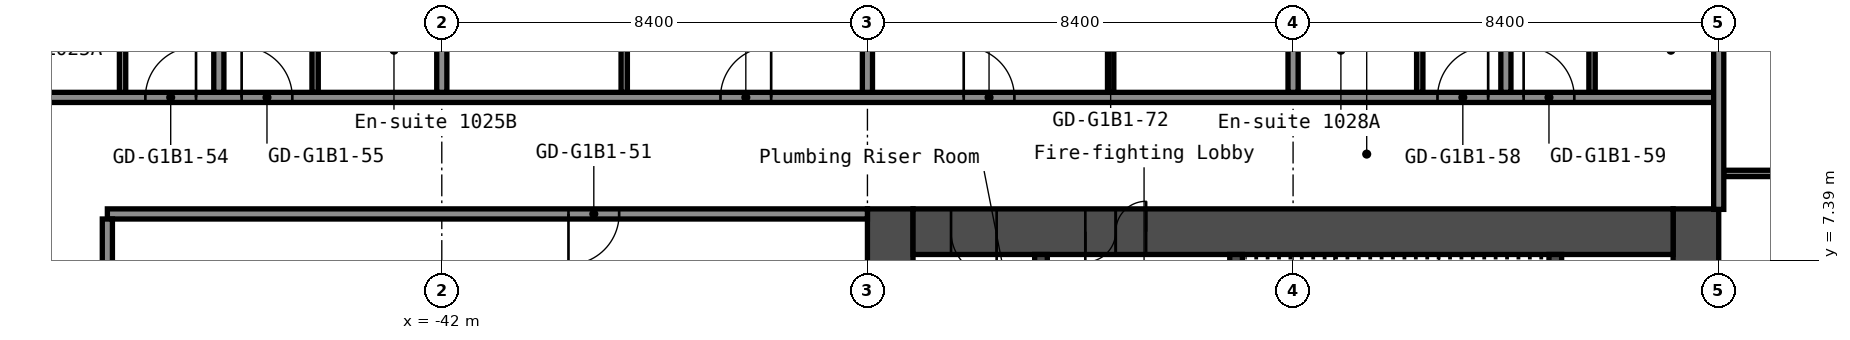
"""IFC4 building model, lengths in metres.
Left out: names, types, materials, properties, quantities, classifications, styles, units other than length and angle.
Written with IfcOpenShell. Run it as: python <this file> out.ifc"""

import sys

from ifc_helpers import new_model, si_unit, direction, frame, frame_2d, origin, place, context, subcontext, project, spatial, rectangle, extrude, element, fill, save


model = new_model("IFC4")
c1 = context("Model", 3, precision=1e-05, world=origin(), true_north=direction((0.0, 1.0)))
c2 = subcontext(c1, "Body", "Model", "MODEL_VIEW")
j1 = project(units=[si_unit("LENGTHUNIT", "METRE"), si_unit("PLANEANGLEUNIT", "RADIAN")], contexts=[c1])
p1 = place(None, origin())
s1 = spatial("IfcSite", under=j1, at=p1, CompositionType="ELEMENT")
p2 = place(p1, origin())
s2 = spatial("IfcBuilding", under=s1, at=p2, CompositionType="ELEMENT")
p3 = place(p2, frame((0.0, 0.0, 39.0)))
s3 = spatial("IfcBuildingStorey", under=s2, at=p3, CompositionType="ELEMENT", Elevation=39.0)
p4 = place(p3, frame((-17.25, -8.4, 0.0), z_axis=(0.0, 0.0, 1.0), x_axis=(0.0, 1.0, 0.0)))
e1 = element("IfcWall", 1, at=p4, inside=s3, PredefinedType="SHEAR", context=c2, shape_type="SweptSolid", body=[
    extrude(rectangle(XDim=16.8, YDim=0.9, at=frame_2d((8.4, 0.0))), origin(), (0.0, 0.0, 1.0), 2.8),
])
p5 = place(p4, frame((12.75, 0.0, 0.0)))
e2 = element("IfcOpeningElement", 2, at=p5, cuts=e1, PredefinedType="OPENING", context=c2, shape_type="SweptSolid", body=[
    extrude(rectangle(XDim=1.2, YDim=2.1, at=frame_2d((0.6, 1.05))), frame((0.0, 0.46, 0.0), z_axis=(0.0, -1.0, 0.0), x_axis=(1.0, 0.0, 0.0)), (0.0, 0.0, 1.0), 0.92),
])
p6 = place(p4, frame((2.85, 0.0, 0.0)))
e3 = element("IfcOpeningElement", 3, at=p6, cuts=e1, PredefinedType="OPENING", context=c2, shape_type="SweptSolid", body=[
    extrude(rectangle(XDim=1.2, YDim=2.1, at=frame_2d((0.6, 1.05))), frame((0.0, 0.46, 0.0), z_axis=(0.0, -1.0, 0.0), x_axis=(1.0, 0.0, 0.0)), (0.0, 0.0, 1.0), 0.92),
])
p7 = place(p3, frame((-33.15, -8.4, 0.0), z_axis=(0.0, 0.0, 1.0), x_axis=(0.0, 1.0, 0.0)))
e4 = element("IfcWall", 4, at=p7, inside=s3, PredefinedType="SHEAR", context=c2, shape_type="SweptSolid", body=[
    extrude(rectangle(XDim=16.8, YDim=0.9, at=frame_2d((8.4, 0.0))), origin(), (0.0, 0.0, 1.0), 2.8),
])
p8 = place(p3, frame((-32.7, 7.95, 0.0), z_axis=(0.0, 0.0, 1.0), x_axis=(1.0, 0.0, 0.0)))
e5 = element("IfcWall", 5, at=p8, inside=s3, PredefinedType="SHEAR", context=c2, shape_type="SweptSolid", body=[
    extrude(rectangle(XDim=15.0, YDim=0.9, at=frame_2d((7.5, 0.0))), origin(), (0.0, 0.0, 1.0), 2.8),
])
p9 = place(p8, frame((3.4, 0.0, 0.0)))
e6 = element("IfcOpeningElement", 6, at=p9, cuts=e5, PredefinedType="OPENING", context=c2, shape_type="SweptSolid", body=[
    extrude(rectangle(XDim=1.2, YDim=2.1, at=frame_2d((0.6, 1.05))), frame((0.0, 0.46, 0.0), z_axis=(0.0, -1.0, 0.0), x_axis=(1.0, 0.0, 0.0)), (0.0, 0.0, 1.0), 0.92),
])
p10 = place(p8, frame((0.75, 0.0, 0.0)))
e7 = element("IfcOpeningElement", 7, at=p10, cuts=e5, PredefinedType="OPENING", context=c2, shape_type="SweptSolid", body=[
    extrude(rectangle(XDim=0.9, YDim=2.1, at=frame_2d((0.45, 1.05))), frame((0.0, 0.46, 0.0), z_axis=(0.0, -1.0, 0.0), x_axis=(1.0, 0.0, 0.0)), (0.0, 0.0, 1.0), 0.92),
])
p11 = place(p3, frame((-20.025, 1.2, 0.0), z_axis=(0.0, 0.0, 1.0), x_axis=(0.0, 1.0, 0.0)))
e8 = element("IfcWall", 8, at=p11, inside=s3, PredefinedType="SHEAR", context=c2, shape_type="SweptSolid", body=[
    extrude(rectangle(XDim=6.3, YDim=0.25, at=frame_2d((3.15, 0.0))), origin(), (0.0, 0.0, 1.0), 2.8),
])
p12 = place(p3, frame((-26.325, 3.75, 0.0), z_axis=(0.0, 0.0, 1.0), x_axis=(0.0, 1.0, 0.0)))
e9 = element("IfcWall", 9, at=p12, inside=s3, PredefinedType="SHEAR", context=c2, shape_type="SweptSolid", body=[
    extrude(rectangle(XDim=3.75, YDim=0.25, at=frame_2d((1.875, 0.0))), origin(), (0.0, 0.0, 1.0), 2.8),
])
p13 = place(p12, frame((1.25, 0.0, 0.0)))
e10 = element("IfcOpeningElement", 10, at=p13, cuts=e9, PredefinedType="OPENING", context=c2, shape_type="SweptSolid", body=[
    extrude(rectangle(XDim=1.2, YDim=2.1, at=frame_2d((0.6, 1.05))), frame((0.0, 0.135, 0.0), z_axis=(0.0, -1.0, 0.0), x_axis=(1.0, 0.0, 0.0)), (0.0, 0.0, 1.0), 0.27),
])
p14 = place(p3, frame((-30.175, 1.45, 0.0), z_axis=(0.0, 0.0, 1.0), x_axis=(0.0, 1.0, 0.0)))
e11 = element("IfcWall", 11, at=p14, inside=s3, PredefinedType="SHEAR", context=c2, shape_type="SweptSolid", body=[
    extrude(rectangle(XDim=6.05, YDim=0.25, at=frame_2d((3.025, 0.0))), origin(), (0.0, 0.0, 1.0), 2.8),
])
p15 = place(p14, frame((2.625, 0.0, 0.0)))
e12 = element("IfcOpeningElement", 12, at=p15, cuts=e11, PredefinedType="OPENING", context=c2, shape_type="SweptSolid", body=[
    extrude(rectangle(XDim=1.1, YDim=2.1, at=frame_2d((0.55, 1.05))), frame((0.0, 0.135, 0.0), z_axis=(0.0, -1.0, 0.0), x_axis=(1.0, 0.0, 0.0)), (0.0, 0.0, 1.0), 0.27),
])
p16 = place(p3, frame((-48.6, 8.3, 0.0), z_axis=(0.0, 0.0, 1.0), x_axis=(1.0, 0.0, 0.0)))
e13 = element("IfcWall", 13, at=p16, inside=s3, PredefinedType="PARTITIONING", context=c2, shape_type="SweptSolid", body=[
    extrude(rectangle(XDim=15.0, YDim=0.2, at=frame_2d((7.5, 0.0))), origin(), (0.0, 0.0, 1.0), 2.8),
])
p17 = place(p16, frame((9.1, 0.0, 0.0)))
e14 = element("IfcOpeningElement", 14, at=p17, cuts=e13, PredefinedType="OPENING", context=c2, shape_type="SweptSolid", body=[
    extrude(rectangle(XDim=1.0, YDim=2.1, at=frame_2d((0.5, 1.05))), frame((0.0, 0.11, 0.0), z_axis=(0.0, -1.0, 0.0), x_axis=(1.0, 0.0, 0.0)), (0.0, 0.0, 1.0), 0.22),
])
p18 = place(p3, frame((-16.7, 9.1, 0.0), z_axis=(0.0, 0.0, 1.0), x_axis=(1.0, 0.0, 0.0)))
e15 = element("IfcWall", 15, at=p18, inside=s3, PredefinedType="PARTITIONING", context=c2, shape_type="SweptSolid", body=[
    extrude(rectangle(XDim=2.337, YDim=0.125, at=frame_2d((1.169, 0.0))), origin(), (0.0, 0.0, 1.0), 2.8),
])
p19 = place(p3, frame((-51.1, 10.6, 0.0), z_axis=(0.0, 0.0, 1.0), x_axis=(1.0, 0.0, 0.0)))
e16 = element("IfcWall", 16, at=p19, inside=s3, PredefinedType="PARTITIONING", context=c2, shape_type="SweptSolid", body=[
    extrude(rectangle(XDim=34.3, YDim=0.2, at=frame_2d((17.15, 0.0))), origin(), (0.0, 0.0, 1.0), 2.8),
])
p20 = place(p19, frame((3.25, 0.0, 0.0)))
e17 = element("IfcOpeningElement", 17, at=p20, cuts=e16, PredefinedType="OPENING", context=c2, shape_type="SweptSolid", body=[
    extrude(rectangle(XDim=1.0, YDim=2.1, at=frame_2d((0.5, 1.05))), frame((0.0, 0.11, 0.0), z_axis=(0.0, -1.0, 0.0), x_axis=(1.0, 0.0, 0.0)), (0.0, 0.0, 1.0), 0.22),
])
p21 = place(p19, frame((5.15, 0.0, 0.0)))
e18 = element("IfcOpeningElement", 18, at=p21, cuts=e16, PredefinedType="OPENING", context=c2, shape_type="SweptSolid", body=[
    extrude(rectangle(XDim=1.0, YDim=2.1, at=frame_2d((0.5, 1.05))), frame((0.0, 0.11, 0.0), z_axis=(0.0, -1.0, 0.0), x_axis=(1.0, 0.0, 0.0)), (0.0, 0.0, 1.0), 0.22),
])
p22 = place(p19, frame((14.6, 0.0, 0.0)))
e19 = element("IfcOpeningElement", 19, at=p22, cuts=e16, PredefinedType="OPENING", context=c2, shape_type="SweptSolid", body=[
    extrude(rectangle(XDim=1.0, YDim=2.1, at=frame_2d((0.5, 1.05))), frame((0.0, 0.11, 0.0), z_axis=(0.0, -1.0, 0.0), x_axis=(1.0, 0.0, 0.0)), (0.0, 0.0, 1.0), 0.22),
])
p23 = place(p19, frame((19.4, 0.0, 0.0)))
e20 = element("IfcOpeningElement", 20, at=p23, cuts=e16, PredefinedType="OPENING", context=c2, shape_type="SweptSolid", body=[
    extrude(rectangle(XDim=1.0, YDim=2.1, at=frame_2d((0.5, 1.05))), frame((0.0, 0.11, 0.0), z_axis=(0.0, -1.0, 0.0), x_axis=(1.0, 0.0, 0.0)), (0.0, 0.0, 1.0), 0.22),
])
p24 = place(p19, frame((28.75, 0.0, 0.0)))
e21 = element("IfcOpeningElement", 21, at=p24, cuts=e16, PredefinedType="OPENING", context=c2, shape_type="SweptSolid", body=[
    extrude(rectangle(XDim=1.0, YDim=2.1, at=frame_2d((0.5, 1.05))), frame((0.0, 0.11, 0.0), z_axis=(0.0, -1.0, 0.0), x_axis=(1.0, 0.0, 0.0)), (0.0, 0.0, 1.0), 0.22),
])
p25 = place(p19, frame((30.45, 0.0, 0.0)))
e22 = element("IfcOpeningElement", 22, at=p25, cuts=e16, PredefinedType="OPENING", context=c2, shape_type="SweptSolid", body=[
    extrude(rectangle(XDim=1.0, YDim=2.1, at=frame_2d((0.5, 1.05))), frame((0.0, 0.11, 0.0), z_axis=(0.0, -1.0, 0.0), x_axis=(1.0, 0.0, 0.0)), (0.0, 0.0, 1.0), 0.22),
])
p26 = place(p3, frame((-48.6, -8.2, 0.0), z_axis=(0.0, 0.0, 1.0), x_axis=(0.0, 1.0, 0.0)))
e23 = element("IfcWall", 23, at=p26, inside=s3, PredefinedType="PARTITIONING", context=c2, shape_type="SweptSolid", body=[
    extrude(rectangle(XDim=16.4, YDim=0.2, at=frame_2d((8.2, 0.0))), origin(), (0.0, 0.0, 1.0), 2.8),
])
p27 = place(p3, frame((-48.3, 10.7, 0.0), z_axis=(0.0, 0.0, 1.0), x_axis=(0.0, 1.0, 0.0)))
e24 = element("IfcWall", 24, at=p27, inside=s3, PredefinedType="PARTITIONING", context=c2, shape_type="SweptSolid", body=[
    extrude(rectangle(XDim=2.9, YDim=0.125, at=frame_2d((1.45, 0.0))), origin(), (0.0, 0.0, 1.0), 2.8),
])
p28 = place(p27, frame((1.5, 0.0, 0.0)))
e25 = element("IfcOpeningElement", 25, at=p28, cuts=e24, PredefinedType="OPENING", context=c2, shape_type="SweptSolid", body=[
    extrude(rectangle(XDim=0.8, YDim=2.1, at=frame_2d((0.4, 1.05))), frame((0.0, 0.073, 0.0), z_axis=(0.0, -1.0, 0.0), x_axis=(1.0, 0.0, 0.0)), (0.0, 0.0, 1.0), 0.145),
])
p29 = place(p3, frame((-46.4, 10.7, 0.0), z_axis=(0.0, 0.0, 1.0), x_axis=(0.0, 1.0, 0.0)))
e26 = element("IfcWall", 26, at=p29, inside=s3, PredefinedType="PARTITIONING", context=c2, shape_type="SweptSolid", body=[
    extrude(rectangle(XDim=9.6, YDim=0.2, at=frame_2d((4.8, 0.0))), origin(), (0.0, 0.0, 1.0), 2.8),
])
p30 = place(p3, frame((-44.5, 10.7, 0.0), z_axis=(0.0, 0.0, 1.0), x_axis=(0.0, 1.0, 0.0)))
e27 = element("IfcWall", 27, at=p30, inside=s3, PredefinedType="PARTITIONING", context=c2, shape_type="SweptSolid", body=[
    extrude(rectangle(XDim=2.9, YDim=0.125, at=frame_2d((1.45, 0.0))), origin(), (0.0, 0.0, 1.0), 2.8),
])
p31 = place(p30, frame((1.5, 0.0, 0.0)))
e28 = element("IfcOpeningElement", 28, at=p31, cuts=e27, PredefinedType="OPENING", context=c2, shape_type="SweptSolid", body=[
    extrude(rectangle(XDim=0.8, YDim=2.1, at=frame_2d((0.4, 1.05))), frame((0.0, 0.073, 0.0), z_axis=(0.0, -1.0, 0.0), x_axis=(1.0, 0.0, 0.0)), (0.0, 0.0, 1.0), 0.145),
])
p32 = place(p3, frame((-42.0, 10.7, 0.0), z_axis=(0.0, 0.0, 1.0), x_axis=(0.0, 1.0, 0.0)))
e29 = element("IfcWall", 29, at=p32, inside=s3, PredefinedType="PARTITIONING", context=c2, shape_type="SweptSolid", body=[
    extrude(rectangle(XDim=9.6, YDim=0.2, at=frame_2d((4.8, 0.0))), origin(), (0.0, 0.0, 1.0), 2.8),
])
p33 = place(p3, frame((-38.4, 10.7, 0.0), z_axis=(0.0, 0.0, 1.0), x_axis=(0.0, 1.0, 0.0)))
e30 = element("IfcWall", 30, at=p33, inside=s3, PredefinedType="PARTITIONING", context=c2, shape_type="SweptSolid", body=[
    extrude(rectangle(XDim=3.3, YDim=0.125, at=frame_2d((1.65, 0.0))), origin(), (0.0, 0.0, 1.0), 2.8),
])
p34 = place(p33, frame((1.1, 0.0, 0.0)))
e31 = element("IfcOpeningElement", 31, at=p34, cuts=e30, PredefinedType="OPENING", context=c2, shape_type="SweptSolid", body=[
    extrude(rectangle(XDim=1.0, YDim=2.1, at=frame_2d((0.5, 1.05))), frame((0.0, 0.073, 0.0), z_axis=(0.0, -1.0, 0.0), x_axis=(1.0, 0.0, 0.0)), (0.0, 0.0, 1.0), 0.145),
])
p35 = place(p3, frame((-33.6, 10.7, 0.0), z_axis=(0.0, 0.0, 1.0), x_axis=(0.0, 1.0, 0.0)))
e32 = element("IfcWall", 32, at=p35, inside=s3, PredefinedType="PARTITIONING", context=c2, shape_type="SweptSolid", body=[
    extrude(rectangle(XDim=9.6, YDim=0.2, at=frame_2d((4.8, 0.0))), origin(), (0.0, 0.0, 1.0), 2.8),
])
p36 = place(p3, frame((-28.8, 10.7, 0.0), z_axis=(0.0, 0.0, 1.0), x_axis=(0.0, 1.0, 0.0)))
e33 = element("IfcWall", 33, at=p36, inside=s3, PredefinedType="PARTITIONING", context=c2, shape_type="SweptSolid", body=[
    extrude(rectangle(XDim=3.3, YDim=0.125, at=frame_2d((1.65, 0.0))), origin(), (0.0, 0.0, 1.0), 2.8),
])
p37 = place(p36, frame((1.1, 0.0, 0.0)))
e34 = element("IfcOpeningElement", 34, at=p37, cuts=e33, PredefinedType="OPENING", context=c2, shape_type="SweptSolid", body=[
    extrude(rectangle(XDim=1.0, YDim=2.1, at=frame_2d((0.5, 1.05))), frame((0.0, 0.073, 0.0), z_axis=(0.0, -1.0, 0.0), x_axis=(1.0, 0.0, 0.0)), (0.0, 0.0, 1.0), 0.145),
])
p38 = place(p3, frame((-25.2, 10.7, 0.0), z_axis=(0.0, 0.0, 1.0), x_axis=(0.0, 1.0, 0.0)))
e35 = element("IfcWall", 35, at=p38, inside=s3, PredefinedType="PARTITIONING", context=c2, shape_type="SweptSolid", body=[
    extrude(rectangle(XDim=9.6, YDim=0.2, at=frame_2d((4.8, 0.0))), origin(), (0.0, 0.0, 1.0), 2.8),
])
p39 = place(p3, frame((-22.7, 10.7, 0.0), z_axis=(0.0, 0.0, 1.0), x_axis=(0.0, 1.0, 0.0)))
e36 = element("IfcWall", 36, at=p39, inside=s3, PredefinedType="PARTITIONING", context=c2, shape_type="SweptSolid", body=[
    extrude(rectangle(XDim=2.9, YDim=0.125, at=frame_2d((1.45, 0.0))), origin(), (0.0, 0.0, 1.0), 2.8),
])
p40 = place(p39, frame((1.5, 0.0, 0.0)))
e37 = element("IfcOpeningElement", 37, at=p40, cuts=e36, PredefinedType="OPENING", context=c2, shape_type="SweptSolid", body=[
    extrude(rectangle(XDim=0.8, YDim=2.1, at=frame_2d((0.4, 1.05))), frame((0.0, 0.073, 0.0), z_axis=(0.0, -1.0, 0.0), x_axis=(1.0, 0.0, 0.0)), (0.0, 0.0, 1.0), 0.145),
])
p41 = place(p3, frame((-21.0, 10.7, 0.0), z_axis=(0.0, 0.0, 1.0), x_axis=(0.0, 1.0, 0.0)))
e38 = element("IfcWall", 38, at=p41, inside=s3, PredefinedType="PARTITIONING", context=c2, shape_type="SweptSolid", body=[
    extrude(rectangle(XDim=9.6, YDim=0.2, at=frame_2d((4.8, 0.0))), origin(), (0.0, 0.0, 1.0), 2.8),
])
p42 = place(p3, frame((-19.3, 10.7, 0.0), z_axis=(0.0, 0.0, 1.0), x_axis=(0.0, 1.0, 0.0)))
e39 = element("IfcWall", 39, at=p42, inside=s3, PredefinedType="PARTITIONING", context=c2, shape_type="SweptSolid", body=[
    extrude(rectangle(XDim=2.9, YDim=0.125, at=frame_2d((1.45, 0.0))), origin(), (0.0, 0.0, 1.0), 2.8),
])
p43 = place(p42, frame((1.5, 0.0, 0.0)))
e40 = element("IfcOpeningElement", 40, at=p43, cuts=e39, PredefinedType="OPENING", context=c2, shape_type="SweptSolid", body=[
    extrude(rectangle(XDim=0.8, YDim=2.1, at=frame_2d((0.4, 1.05))), frame((0.0, 0.073, 0.0), z_axis=(0.0, -1.0, 0.0), x_axis=(1.0, 0.0, 0.0)), (0.0, 0.0, 1.0), 0.145),
])
p44 = place(p3, frame((-16.8, 8.39, 0.0), z_axis=(0.0, 0.0, 1.0), x_axis=(0.0, 1.0, 0.0)))
e41 = element("IfcWall", 41, at=p44, inside=s3, PredefinedType="PARTITIONING", context=c2, shape_type="SweptSolid", body=[
    extrude(rectangle(XDim=11.91, YDim=0.2, at=frame_2d((5.955, 0.0))), origin(), (0.0, 0.0, 1.0), 2.8),
])
p45 = place(p9, origin())
e42 = element("IfcDoor", 42, at=p45, inside=s3, OperationType="DOUBLE_DOOR_SINGLE_SWING", PredefinedType="DOOR", context=c2, shape_type="SweptSolid", body=[
    extrude(rectangle(XDim=1.2, YDim=2.1, at=frame_2d((0.6, 1.05))), frame((0.0, 0.025, 0.0), z_axis=(0.0, -1.0, 0.0), x_axis=(1.0, 0.0, 0.0)), (0.0, 0.0, 1.0), 0.05),
])
fill(e6, e42)
p46 = place(p10, origin())
e43 = element("IfcDoor", 43, at=p46, inside=s3, OperationType="SINGLE_SWING_RIGHT", PredefinedType="DOOR", context=c2, shape_type="SweptSolid", body=[
    extrude(rectangle(XDim=0.9, YDim=2.1, at=frame_2d((0.45, 1.05))), frame((0.0, 0.025, 0.0), z_axis=(0.0, -1.0, 0.0), x_axis=(1.0, 0.0, 0.0)), (0.0, 0.0, 1.0), 0.05),
])
fill(e7, e43)
p47 = place(p17, origin())
e44 = element("IfcDoor", 44, at=p47, inside=s3, OperationType="SINGLE_SWING_LEFT", PredefinedType="DOOR", context=c2, shape_type="SweptSolid", body=[
    extrude(rectangle(XDim=1.0, YDim=2.1, at=frame_2d((0.5, 1.05))), frame((0.0, 0.025, 0.0), z_axis=(0.0, -1.0, 0.0), x_axis=(1.0, 0.0, 0.0)), (0.0, 0.0, 1.0), 0.05),
])
fill(e14, e44)
p48 = place(p20, origin())
e45 = element("IfcDoor", 45, at=p48, inside=s3, OperationType="SINGLE_SWING_LEFT", PredefinedType="DOOR", context=c2, shape_type="SweptSolid", body=[
    extrude(rectangle(XDim=1.0, YDim=2.1, at=frame_2d((0.5, 1.05))), frame((0.0, 0.025, 0.0), z_axis=(0.0, -1.0, 0.0), x_axis=(1.0, 0.0, 0.0)), (0.0, 0.0, 1.0), 0.05),
])
fill(e17, e45)
p49 = place(p21, origin())
e46 = element("IfcDoor", 46, at=p49, inside=s3, OperationType="SINGLE_SWING_RIGHT", PredefinedType="DOOR", context=c2, shape_type="SweptSolid", body=[
    extrude(rectangle(XDim=1.0, YDim=2.1, at=frame_2d((0.5, 1.05))), frame((0.0, 0.025, 0.0), z_axis=(0.0, -1.0, 0.0), x_axis=(1.0, 0.0, 0.0)), (0.0, 0.0, 1.0), 0.05),
])
fill(e18, e46)
p50 = place(p22, origin())
e47 = element("IfcDoor", 47, at=p50, inside=s3, OperationType="SINGLE_SWING_LEFT", PredefinedType="DOOR", context=c2, shape_type="SweptSolid", body=[
    extrude(rectangle(XDim=1.0, YDim=2.1, at=frame_2d((0.5, 1.05))), frame((0.0, 0.025, 0.0), z_axis=(0.0, -1.0, 0.0), x_axis=(1.0, 0.0, 0.0)), (0.0, 0.0, 1.0), 0.05),
])
fill(e19, e47)
p51 = place(p23, origin())
e48 = element("IfcDoor", 48, at=p51, inside=s3, OperationType="SINGLE_SWING_RIGHT", PredefinedType="DOOR", context=c2, shape_type="SweptSolid", body=[
    extrude(rectangle(XDim=1.0, YDim=2.1, at=frame_2d((0.5, 1.05))), frame((0.0, 0.025, 0.0), z_axis=(0.0, -1.0, 0.0), x_axis=(1.0, 0.0, 0.0)), (0.0, 0.0, 1.0), 0.05),
])
fill(e20, e48)
p52 = place(p24, origin())
e49 = element("IfcDoor", 49, at=p52, inside=s3, OperationType="SINGLE_SWING_LEFT", PredefinedType="DOOR", context=c2, shape_type="SweptSolid", body=[
    extrude(rectangle(XDim=1.0, YDim=2.1, at=frame_2d((0.5, 1.05))), frame((0.0, 0.025, 0.0), z_axis=(0.0, -1.0, 0.0), x_axis=(1.0, 0.0, 0.0)), (0.0, 0.0, 1.0), 0.05),
])
fill(e21, e49)
p53 = place(p25, origin())
e50 = element("IfcDoor", 50, at=p53, inside=s3, OperationType="SINGLE_SWING_RIGHT", PredefinedType="DOOR", context=c2, shape_type="SweptSolid", body=[
    extrude(rectangle(XDim=1.0, YDim=2.1, at=frame_2d((0.5, 1.05))), frame((0.0, 0.025, 0.0), z_axis=(0.0, -1.0, 0.0), x_axis=(1.0, 0.0, 0.0)), (0.0, 0.0, 1.0), 0.05),
])
fill(e22, e50)
save(model, sys.argv[1])
